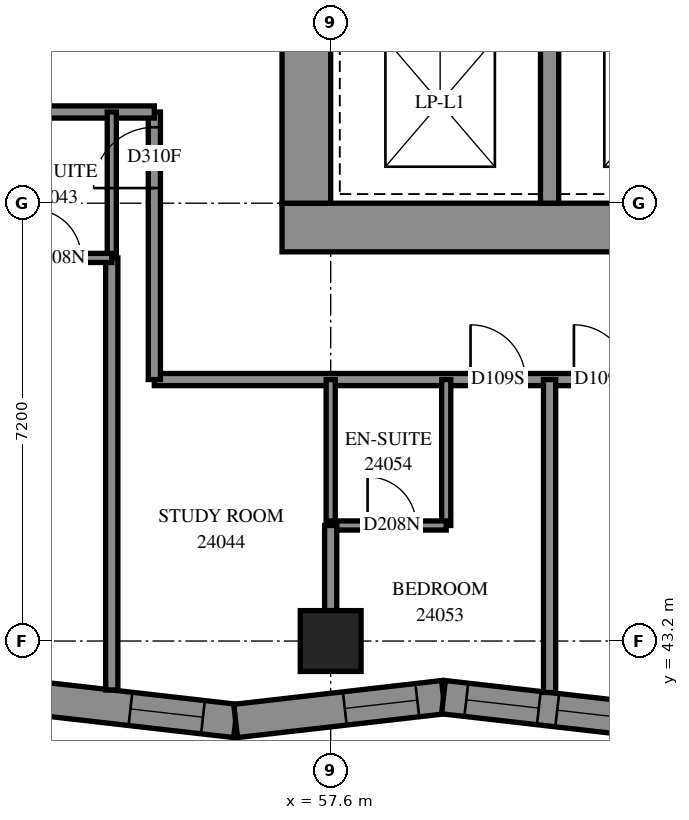
"""IFC4 building model, lengths in metres.
Left out: names, types, materials, properties, quantities, classifications, styles, units other than length and angle.
Written with IfcOpenShell. Run it as: python <this file> out.ifc"""

import sys

from ifc_helpers import new_model, si_unit, direction, frame, frame_2d, origin, origin_2d, place, context, subcontext, project, spatial, polyline, rectangle, outline, extrude, element, fill, save


model = new_model("IFC4")
c1 = context("Model", 3, precision=1e-05, world=origin(), true_north=direction((0.0, 1.0)))
c2 = subcontext(c1, "Body", "Model", "MODEL_VIEW")
j1 = project(units=[si_unit("LENGTHUNIT", "METRE"), si_unit("PLANEANGLEUNIT", "RADIAN")], contexts=[c1])
p1 = place(None, origin())
s1 = spatial("IfcSite", under=j1, at=p1, CompositionType="ELEMENT")
p2 = place(p1, origin())
s2 = spatial("IfcBuilding", under=s1, at=p2, CompositionType="ELEMENT")
p3 = place(p2, frame((0.0, 0.0, 91.4)))
s3 = spatial("IfcBuildingStorey", under=s2, at=p3, CompositionType="ELEMENT", Elevation=91.4)
p4 = place(p3, frame((57.6, 43.2, 0.0), z_axis=(0.0, 0.0, 1.0), x_axis=(1.0, 0.0, 0.0)))
e1 = element("IfcColumn", 1, at=p4, inside=s3, PredefinedType="COLUMN", context=c2, shape_type="SweptSolid", body=[
    extrude(rectangle(XDim=1.0, YDim=1.0, at=origin_2d()), origin(), (0.0, 0.0, 1.0), 3.1),
])
p5 = place(p3, frame((56.8, 50.0, -0.3), z_axis=(0.0, 0.0, 1.0), x_axis=(1.0, 0.0, 0.0)))
e2 = element("IfcWall", 2, at=p5, inside=s3, PredefinedType="SHEAR", context=c2, shape_type="SweptSolid", body=[
    extrude(rectangle(XDim=16.0, YDim=0.8, at=frame_2d((8.0, 0.0))), origin(), (0.0, 0.0, 1.0), 2.7),
])
p6 = place(p3, frame((57.2, 50.4, -0.3), z_axis=(0.0, 0.0, 1.0), x_axis=(0.0, 1.0, 0.0)))
e3 = element("IfcWall", 3, at=p6, inside=s3, PredefinedType="SHEAR", context=c2, shape_type="SweptSolid", body=[
    extrude(rectangle(XDim=14.4, YDim=0.8, at=frame_2d((7.2, 0.0))), origin(), (0.0, 0.0, 1.0), 2.7),
])
p7 = place(p6, frame((4.55, 0.0, 0.3)))
e4 = element("IfcOpeningElement", 4, at=p7, cuts=e3, PredefinedType="OPENING", context=c2, shape_type="SweptSolid", body=[
    extrude(rectangle(XDim=1.1, YDim=2.1, at=frame_2d((0.55, 1.05))), frame((0.0, 0.41, 0.0), z_axis=(0.0, -1.0, 0.0), x_axis=(1.0, 0.0, 0.0)), (0.0, 0.0, 1.0), 0.82),
])
p8 = place(p6, frame((11.35, 0.0, 0.3)))
e5 = element("IfcOpeningElement", 5, at=p8, cuts=e3, PredefinedType="OPENING", context=c2, shape_type="SweptSolid", body=[
    extrude(rectangle(XDim=1.1, YDim=2.1, at=frame_2d((0.55, 1.05))), frame((0.0, 0.41, 0.0), z_axis=(0.0, -1.0, 0.0), x_axis=(1.0, 0.0, 0.0)), (0.0, 0.0, 1.0), 0.82),
])
p9 = place(p3, frame((61.2, 50.4, 0.0), z_axis=(0.0, 0.0, 1.0), x_axis=(0.0, 1.0, 0.0)))
e6 = element("IfcWall", 6, at=p9, inside=s3, PredefinedType="SOLIDWALL", context=c2, shape_type="SweptSolid", body=[
    extrude(rectangle(XDim=3.3, YDim=0.3, at=frame_2d((1.65, 0.0))), origin(), (0.0, 0.0, 1.0), 3.1),
])
p10 = place(p3, frame((52.595, 42.279, 0.0), z_axis=(0.0, 0.0, 1.0), x_axis=(0.9935212234, -0.1136467272, 0.0)))
e7 = element("IfcWall", 7, at=p10, inside=s3, PredefinedType="SOLIDWALL", context=c2, shape_type="SweptSolid", body=[
    extrude(outline(polyline([(0.055, -0.275), (3.496, -0.275), (3.433, 0.275), (-0.055, 0.275), (0.055, -0.275)])), origin(), (0.0, 0.0, 1.0), 3.1),
])
p11 = place(p10, frame((1.724, 0.0, 0.5)))
e8 = element("IfcOpeningElement", 8, at=p11, cuts=e7, PredefinedType="OPENING", context=c2, shape_type="SweptSolid", body=[
    extrude(rectangle(XDim=1.2, YDim=2.45, at=frame_2d((0.6, 1.225))), frame((0.0, 0.285, 0.0), z_axis=(0.0, -1.0, 0.0), x_axis=(1.0, 0.0, 0.0)), (0.0, 0.0, 1.0), 0.57),
])
p12 = place(p3, frame((56.036, 41.886, 0.0), z_axis=(0.0, 0.0, 1.0), x_axis=(0.9935208627, 0.1136498807, 0.0)))
e9 = element("IfcWall", 9, at=p12, inside=s3, PredefinedType="SOLIDWALL", context=c2, shape_type="SweptSolid", body=[
    extrude(outline(polyline([(-0.032, -0.275), (3.409, -0.275), (3.472, 0.275), (0.032, 0.275), (-0.032, -0.275)])), origin(), (0.0, 0.0, 1.0), 3.1),
])
p13 = place(p12, frame((1.807, 0.0, 0.5)))
e10 = element("IfcOpeningElement", 10, at=p13, cuts=e9, PredefinedType="OPENING", context=c2, shape_type="SweptSolid", body=[
    extrude(rectangle(XDim=1.2, YDim=2.45, at=frame_2d((0.6, 1.225))), frame((0.0, 0.285, 0.0), z_axis=(0.0, -1.0, 0.0), x_axis=(1.0, 0.0, 0.0)), (0.0, 0.0, 1.0), 0.57),
])
p14 = place(p3, frame((59.455, 42.277, 0.0), z_axis=(0.0, 0.0, 1.0), x_axis=(0.9935212381, -0.1136465988, 0.0)))
e11 = element("IfcWall", 11, at=p14, inside=s3, PredefinedType="SOLIDWALL", context=c2, shape_type="SweptSolid", body=[
    extrude(outline(polyline([(0.032, -0.275), (3.472, -0.275), (3.409, 0.275), (-0.032, 0.275), (0.032, -0.275)])), origin(), (0.0, 0.0, 1.0), 3.1),
])
p15 = place(p14, frame((0.378, 0.0, 0.5)))
e12 = element("IfcOpeningElement", 12, at=p15, cuts=e11, PredefinedType="OPENING", context=c2, shape_type="SweptSolid", body=[
    extrude(rectangle(XDim=1.2, YDim=2.45, at=frame_2d((0.6, 1.225))), frame((0.0, 0.285, 0.0), z_axis=(0.0, -1.0, 0.0), x_axis=(1.0, 0.0, 0.0)), (0.0, 0.0, 1.0), 0.57),
])
p16 = place(p14, frame((1.883, 0.0, 0.5)))
e13 = element("IfcOpeningElement", 13, at=p16, cuts=e11, PredefinedType="OPENING", context=c2, shape_type="SweptSolid", body=[
    extrude(rectangle(XDim=1.2, YDim=2.45, at=frame_2d((0.6, 1.225))), frame((0.0, 0.285, 0.0), z_axis=(0.0, -1.0, 0.0), x_axis=(1.0, 0.0, 0.0)), (0.0, 0.0, 1.0), 0.57),
])
p17 = place(p3, frame((54.7, 47.5, 0.0), z_axis=(0.0, 0.0, 1.0), x_axis=(1.0, 0.0, 0.0)))
e14 = element("IfcWall", 14, at=p17, inside=s3, PredefinedType="PARTITIONING", context=c2, shape_type="SweptSolid", body=[
    extrude(rectangle(XDim=19.442, YDim=0.2, at=frame_2d((9.721, 0.0))), origin(), (0.0, 0.0, 1.0), 3.1),
])
p18 = place(p17, frame((5.2, 0.0, 0.0)))
e15 = element("IfcOpeningElement", 15, at=p18, cuts=e14, PredefinedType="OPENING", context=c2, shape_type="SweptSolid", body=[
    extrude(rectangle(XDim=0.9, YDim=2.1, at=frame_2d((0.45, 1.05))), frame((0.0, 0.11, 0.0), z_axis=(0.0, -1.0, 0.0), x_axis=(1.0, 0.0, 0.0)), (0.0, 0.0, 1.0), 0.22),
])
p19 = place(p17, frame((6.9, 0.0, 0.0)))
e16 = element("IfcOpeningElement", 16, at=p19, cuts=e14, PredefinedType="OPENING", context=c2, shape_type="SweptSolid", body=[
    extrude(rectangle(XDim=0.9, YDim=2.1, at=frame_2d((0.45, 1.05))), frame((0.0, 0.11, 0.0), z_axis=(0.0, -1.0, 0.0), x_axis=(1.0, 0.0, 0.0)), (0.0, 0.0, 1.0), 0.22),
])
p20 = place(p17, frame((13.963, 0.0, 0.0)))
e17 = element("IfcOpeningElement", 17, at=p20, cuts=e14, PredefinedType="OPENING", context=c2, shape_type="SweptSolid", body=[
    extrude(rectangle(XDim=1.0, YDim=2.1, at=frame_2d((0.5, 1.05))), frame((0.0, 0.11, 0.0), z_axis=(0.0, -1.0, 0.0), x_axis=(1.0, 0.0, 0.0)), (0.0, 0.0, 1.0), 0.22),
])
p21 = place(p3, frame((54.0, 42.395, 0.0), z_axis=(0.0, 0.0, 1.0), x_axis=(0.0, 1.0, 0.0)))
e18 = element("IfcWall", 18, at=p21, inside=s3, PredefinedType="PARTITIONING", context=c2, shape_type="SweptSolid", body=[
    extrude(rectangle(XDim=7.104, YDim=0.2, at=frame_2d((3.552, 0.0))), origin(), (0.0, 0.0, 1.0), 3.1),
])
p22 = place(p3, frame((61.2, 42.354, 0.0), z_axis=(0.0, 0.0, 1.0), x_axis=(0.0, 1.0, 0.0)))
e19 = element("IfcWall", 19, at=p22, inside=s3, PredefinedType="PARTITIONING", context=c2, shape_type="SweptSolid", body=[
    extrude(rectangle(XDim=5.146, YDim=0.2, at=frame_2d((2.573, 0.0))), origin(), (0.0, 0.0, 1.0), 3.1),
])
p23 = place(p3, frame((54.7, 47.5, 0.0), z_axis=(0.0, 0.0, 1.0), x_axis=(0.0, 1.0, 0.0)))
e20 = element("IfcWall", 20, at=p23, inside=s3, PredefinedType="PARTITIONING", context=c2, shape_type="SweptSolid", body=[
    extrude(rectangle(XDim=4.4, YDim=0.2, at=frame_2d((2.2, 0.0))), origin(), (0.0, 0.0, 1.0), 3.1),
])
p24 = place(p23, frame((3.149, 0.0, 0.0)))
e21 = element("IfcOpeningElement", 21, at=p24, cuts=e20, PredefinedType="OPENING", context=c2, shape_type="SweptSolid", body=[
    extrude(rectangle(XDim=1.0, YDim=2.1, at=frame_2d((0.5, 1.05))), frame((0.0, 0.11, 0.0), z_axis=(0.0, -1.0, 0.0), x_axis=(1.0, 0.0, 0.0)), (0.0, 0.0, 1.0), 0.22),
])
p25 = place(p3, frame((50.4, 51.9, 0.0), z_axis=(0.0, 0.0, 1.0), x_axis=(1.0, 0.0, 0.0)))
e22 = element("IfcWall", 22, at=p25, inside=s3, PredefinedType="PARTITIONING", context=c2, shape_type="SweptSolid", body=[
    extrude(rectangle(XDim=4.3, YDim=0.2, at=frame_2d((2.15, 0.0))), origin(), (0.0, 0.0, 1.0), 3.1),
])
p26 = place(p25, frame((0.552, 0.0, 0.0)))
e23 = element("IfcOpeningElement", 23, at=p26, cuts=e22, PredefinedType="OPENING", context=c2, shape_type="SweptSolid", body=[
    extrude(rectangle(XDim=0.9, YDim=2.1, at=frame_2d((0.45, 1.05))), frame((0.0, 0.11, 0.0), z_axis=(0.0, -1.0, 0.0), x_axis=(1.0, 0.0, 0.0)), (0.0, 0.0, 1.0), 0.22),
])
for number, where, z_axis, x_axis in (
    (24, (54.0, 49.5, 0.0), (0.0, 0.0, 1.0), (0.0, 1.0, 0.0)),
    (25, (59.5, 45.1, 0.0), (0.0, 0.0, 1.0), (0.0, 1.0, 0.0)),
    (26, (57.6, 45.1, 0.0), (0.0, 0.0, 1.0), (0.0, 1.0, 0.0)),
):
    element("IfcWall", number, at=place(p3, frame(where, z_axis=z_axis, x_axis=x_axis)), inside=s3, PredefinedType="PARTITIONING", context=c2, shape_type="SweptSolid", body=[
        extrude(rectangle(XDim=2.4, YDim=0.15, at=frame_2d((1.2, 0.0))), origin(), (0.0, 0.0, 1.0), 3.1),
    ])
p27 = place(p3, frame((52.1, 49.5, 0.0), z_axis=(0.0, 0.0, 1.0), x_axis=(1.0, 0.0, 0.0)))
e27 = element("IfcWall", 27, at=p27, inside=s3, PredefinedType="PARTITIONING", context=c2, shape_type="SweptSolid", body=[
    extrude(rectangle(XDim=1.9, YDim=0.15, at=frame_2d((0.95, 0.0))), origin(), (0.0, 0.0, 1.0), 3.1),
])
p28 = place(p27, frame((0.598, 0.0, 0.0)))
e28 = element("IfcOpeningElement", 28, at=p28, cuts=e27, PredefinedType="OPENING", context=c2, shape_type="SweptSolid", body=[
    extrude(rectangle(XDim=0.8, YDim=2.1, at=frame_2d((0.4, 1.05))), frame((0.0, 0.085, 0.0), z_axis=(0.0, -1.0, 0.0), x_axis=(1.0, 0.0, 0.0)), (0.0, 0.0, 1.0), 0.17),
])
p29 = place(p3, frame((57.6, 45.1, 0.0), z_axis=(0.0, 0.0, 1.0), x_axis=(1.0, 0.0, 0.0)))
e29 = element("IfcWall", 29, at=p29, inside=s3, PredefinedType="PARTITIONING", context=c2, shape_type="SweptSolid", body=[
    extrude(rectangle(XDim=1.9, YDim=0.15, at=frame_2d((0.95, 0.0))), origin(), (0.0, 0.0, 1.0), 3.1),
])
p30 = place(p29, frame((0.607, 0.0, 0.0)))
e30 = element("IfcOpeningElement", 30, at=p30, cuts=e29, PredefinedType="OPENING", context=c2, shape_type="SweptSolid", body=[
    extrude(rectangle(XDim=0.8, YDim=2.1, at=frame_2d((0.4, 1.05))), frame((0.0, 0.085, 0.0), z_axis=(0.0, -1.0, 0.0), x_axis=(1.0, 0.0, 0.0)), (0.0, 0.0, 1.0), 0.17),
])
p31 = place(p3, frame((57.6, 43.7, 0.0), z_axis=(0.0, 0.0, 1.0), x_axis=(0.0, 1.0, 0.0)))
e31 = element("IfcWall", 31, at=p31, inside=s3, PredefinedType="PARTITIONING", context=c2, shape_type="SweptSolid", body=[
    extrude(rectangle(XDim=1.4, YDim=0.2, at=frame_2d((0.7, 0.0))), origin(), (0.0, 0.0, 1.0), 3.1),
])
p32 = place(p11, origin())
e32 = element("IfcWindow", 32, at=p32, inside=s3, PartitioningType="SINGLE_PANEL", PredefinedType="WINDOW", context=c2, shape_type="SweptSolid", body=[
    extrude(rectangle(XDim=1.2, YDim=2.45, at=frame_2d((0.6, 1.225))), frame((0.0, 0.155, 0.0), z_axis=(0.0, -1.0, 0.0), x_axis=(1.0, 0.0, 0.0)), (0.0, 0.0, 1.0), 0.06),
])
fill(e8, e32)
p33 = place(p13, origin())
e33 = element("IfcWindow", 33, at=p33, inside=s3, PartitioningType="SINGLE_PANEL", PredefinedType="WINDOW", context=c2, shape_type="SweptSolid", body=[
    extrude(rectangle(XDim=1.2, YDim=2.45, at=frame_2d((0.6, 1.225))), frame((0.0, 0.155, 0.0), z_axis=(0.0, -1.0, 0.0), x_axis=(1.0, 0.0, 0.0)), (0.0, 0.0, 1.0), 0.06),
])
fill(e10, e33)
p34 = place(p15, origin())
e34 = element("IfcWindow", 34, at=p34, inside=s3, PartitioningType="SINGLE_PANEL", PredefinedType="WINDOW", context=c2, shape_type="SweptSolid", body=[
    extrude(rectangle(XDim=1.2, YDim=2.45, at=frame_2d((0.6, 1.225))), frame((0.0, 0.155, 0.0), z_axis=(0.0, -1.0, 0.0), x_axis=(1.0, 0.0, 0.0)), (0.0, 0.0, 1.0), 0.06),
])
fill(e12, e34)
p35 = place(p16, origin())
e35 = element("IfcWindow", 35, at=p35, inside=s3, PartitioningType="SINGLE_PANEL", PredefinedType="WINDOW", context=c2, shape_type="SweptSolid", body=[
    extrude(rectangle(XDim=1.2, YDim=2.45, at=frame_2d((0.6, 1.225))), frame((0.0, 0.155, 0.0), z_axis=(0.0, -1.0, 0.0), x_axis=(1.0, 0.0, 0.0)), (0.0, 0.0, 1.0), 0.06),
])
fill(e13, e35)
p36 = place(p28, origin())
e36 = element("IfcDoor", 36, at=p36, inside=s3, OperationType="SINGLE_SWING_RIGHT", PredefinedType="DOOR", context=c2, shape_type="SweptSolid", body=[
    extrude(rectangle(XDim=0.8, YDim=2.1, at=frame_2d((0.4, 1.05))), frame((0.0, 0.025, 0.0), z_axis=(0.0, -1.0, 0.0), x_axis=(1.0, 0.0, 0.0)), (0.0, 0.0, 1.0), 0.05),
])
fill(e28, e36)
p37 = place(p24, origin())
e37 = element("IfcDoor", 37, at=p37, inside=s3, OperationType="SINGLE_SWING_RIGHT", PredefinedType="DOOR", context=c2, shape_type="SweptSolid", body=[
    extrude(rectangle(XDim=1.0, YDim=2.1, at=frame_2d((0.5, 1.05))), frame((0.0, 0.025, 0.0), z_axis=(0.0, -1.0, 0.0), x_axis=(1.0, 0.0, 0.0)), (0.0, 0.0, 1.0), 0.05),
])
fill(e21, e37)
p38 = place(p18, origin())
e38 = element("IfcDoor", 38, at=p38, inside=s3, OperationType="SINGLE_SWING_LEFT", PredefinedType="DOOR", context=c2, shape_type="SweptSolid", body=[
    extrude(rectangle(XDim=0.9, YDim=2.1, at=frame_2d((0.45, 1.05))), frame((0.0, 0.025, 0.0), z_axis=(0.0, -1.0, 0.0), x_axis=(1.0, 0.0, 0.0)), (0.0, 0.0, 1.0), 0.05),
])
fill(e15, e38)
p39 = place(p30, origin())
e39 = element("IfcDoor", 39, at=p39, inside=s3, OperationType="SINGLE_SWING_RIGHT", PredefinedType="DOOR", context=c2, shape_type="SweptSolid", body=[
    extrude(rectangle(XDim=0.8, YDim=2.1, at=frame_2d((0.4, 1.05))), frame((0.0, 0.025, 0.0), z_axis=(0.0, -1.0, 0.0), x_axis=(1.0, 0.0, 0.0)), (0.0, 0.0, 1.0), 0.05),
])
fill(e30, e39)
p40 = place(p19, origin())
e40 = element("IfcDoor", 40, at=p40, inside=s3, OperationType="SINGLE_SWING_RIGHT", PredefinedType="DOOR", context=c2, shape_type="SweptSolid", body=[
    extrude(rectangle(XDim=0.9, YDim=2.1, at=frame_2d((0.45, 1.05))), frame((0.0, 0.025, 0.0), z_axis=(0.0, -1.0, 0.0), x_axis=(1.0, 0.0, 0.0)), (0.0, 0.0, 1.0), 0.05),
])
fill(e16, e40)
save(model, sys.argv[1])
